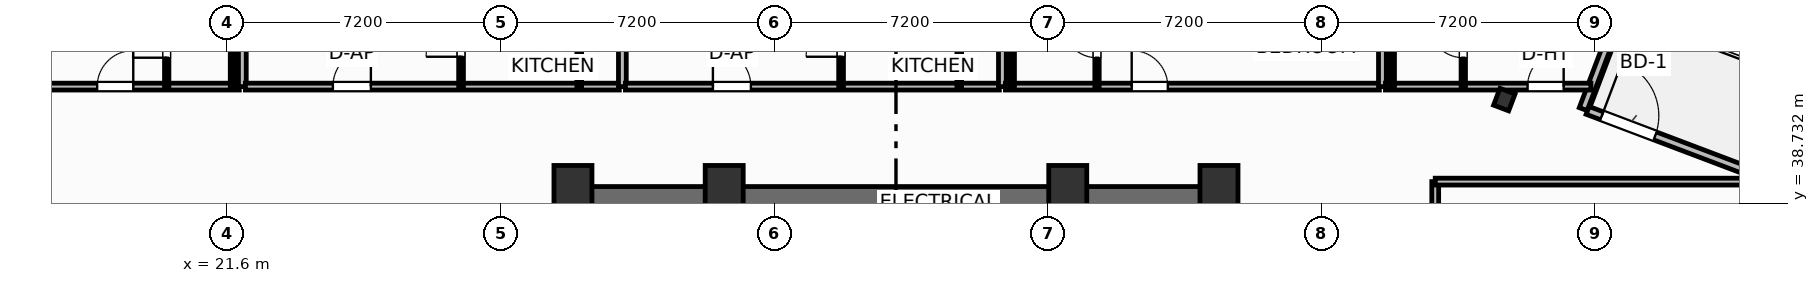
"""IFC4 building model, lengths in metres.
Left out: names, types, materials, properties, quantities, classifications, styles, units other than length and angle.
Written with IfcOpenShell. Run it as: python <this file> out.ifc"""

import sys

from ifc_helpers import new_model, si_unit, direction, frame, frame_2d, origin, origin_2d, place, context, subcontext, project, spatial, rectangle, i_section, extrude, element, fill, save


model = new_model("IFC4")
c1 = context("Model", 3, precision=1e-05, world=origin(), true_north=direction((0.0, 1.0)))
c2 = subcontext(c1, "Body", "Model", "MODEL_VIEW")
j1 = project(units=[si_unit("LENGTHUNIT", "METRE"), si_unit("PLANEANGLEUNIT", "RADIAN")], contexts=[c1])
p1 = place(None, origin())
s1 = spatial("IfcSite", under=j1, at=p1, CompositionType="ELEMENT")
p2 = place(p1, origin())
s2 = spatial("IfcBuilding", under=s1, at=p2, CompositionType="ELEMENT")
p3 = place(p2, frame((0.0, 0.0, 105.8)))
s3 = spatial("IfcBuildingStorey", under=s2, at=p3, CompositionType="ELEMENT", Elevation=105.8)
for number, where, z_axis, x_axis in (
    (1, (30.7, 39.05, 0.0), (0.0, 0.0, 1.0), (1.0, 0.0, 0.0)),
    (2, (34.68, 39.05, 0.0), (0.0, 0.0, 1.0), (1.0, 0.0, 0.0)),
    (3, (43.72, 39.05, 0.0), (0.0, 0.0, 1.0), (1.0, 0.0, 0.0)),
    (4, (47.7, 39.05, 0.0), (0.0, 0.0, 1.0), (1.0, 0.0, 0.0)),
):
    element("IfcColumn", number, at=place(p3, frame(where, z_axis=z_axis, x_axis=x_axis)), inside=s3, PredefinedType="COLUMN", context=c2, shape_type="SweptSolid", body=[
        extrude(rectangle(XDim=1.0, YDim=1.35, at=origin_2d()), origin(), (0.0, 0.0, 1.0), 3.7),
    ])
p4 = place(p3, frame((30.38, 38.795, 0.0), z_axis=(0.0, 0.0, 1.0), x_axis=(1.0, 0.0, 0.0)))
e5 = element("IfcWall", 5, at=p4, inside=s3, PredefinedType="SHEAR", context=c2, shape_type="SweptSolid", body=[
    extrude(rectangle(XDim=17.64, YDim=0.75, at=frame_2d((8.82, 0.0))), origin(), (0.0, 0.0, 1.0), 3.45),
])
p5 = place(p3, frame((55.208, 41.459, 0.0), z_axis=(0.0, 0.0, 1.0), x_axis=(0.935221751401, -0.354062530786, 0.0)))
e6 = element("IfcColumn", 6, at=p5, inside=s3, PredefinedType="COLUMN", context=c2, shape_type="SweptSolid", body=[
    extrude(i_section(OverallWidth=0.424, OverallDepth=0.474, WebThickness=0.048, FlangeThickness=0.077, FilletRadius=0.025, at=origin_2d()), origin(), (0.0, 0.0, 1.0), 3.7),
])
p6 = place(p3, frame((57.399, 41.175, 0.0), z_axis=(0.0, 0.0, 1.0), x_axis=(0.935227640088, -0.354046976001, 0.0)))
e7 = element("IfcWall", 7, at=p6, inside=s3, PredefinedType="SOLIDWALL", context=c2, shape_type="SweptSolid", body=[
    extrude(rectangle(XDim=6.0, YDim=0.22, at=frame_2d((3.0, 0.0))), origin(), (0.0, 0.0, 1.0), 2.73),
])
p7 = place(p6, frame((0.4, 0.0, 0.0)))
e8 = element("IfcOpeningElement", 8, at=p7, cuts=e7, PredefinedType="OPENING", context=c2, shape_type="SweptSolid", body=[
    extrude(rectangle(XDim=1.5, YDim=2.25, at=frame_2d((0.75, 1.125))), frame((0.0, 0.12, 0.0), z_axis=(0.0, -1.0, 0.0), x_axis=(1.0, 0.0, 0.0)), (0.0, 0.0, 1.0), 0.24),
])
p8 = place(p3, frame((57.284, 41.208, 0.0), z_axis=(0.0, 0.0, 1.0), x_axis=(0.354128469405, 0.935196785258, 0.0)))
e9 = element("IfcWall", 9, at=p8, inside=s3, PredefinedType="SOLIDWALL", context=c2, shape_type="SweptSolid", body=[
    extrude(rectangle(XDim=2.1, YDim=0.22, at=frame_2d((1.05, 0.0))), origin(), (0.0, 0.0, 1.0), 2.73),
])
p9 = place(p3, frame((5.646, 41.8, 0.0), z_axis=(0.0, 0.0, 1.0), x_axis=(1.0, 0.0, 0.0)))
e10 = element("IfcWall", 10, at=p9, inside=s3, PredefinedType="PARTITIONING", context=c2, shape_type="SweptSolid", body=[
    extrude(rectangle(XDim=16.274, YDim=0.18, at=frame_2d((8.137, 0.0))), origin(), (0.0, 0.0, 1.0), 3.45),
])
p10 = place(p9, frame((12.534, 0.0, 0.0)))
e11 = element("IfcOpeningElement", 11, at=p10, cuts=e10, PredefinedType="OPENING", context=c2, shape_type="SweptSolid", body=[
    extrude(rectangle(XDim=0.95, YDim=2.15, at=frame_2d((0.475, 1.075))), frame((0.0, 0.1, 0.0), z_axis=(0.0, -1.0, 0.0), x_axis=(1.0, 0.0, 0.0)), (0.0, 0.0, 1.0), 0.2),
])
p11 = place(p3, frame((20.01, 41.8, 0.0), z_axis=(0.0, 0.0, 1.0), x_axis=(0.0, 1.0, 0.0)))
e12 = element("IfcWall", 12, at=p11, inside=s3, PredefinedType="PARTITIONING", context=c2, shape_type="SweptSolid", body=[
    extrude(rectangle(XDim=2.52, YDim=0.115, at=frame_2d((1.26, 0.0))), origin(), (0.0, 0.0, 1.0), 3.45),
])
p12 = place(p11, frame((0.76, 0.0, 0.0)))
e13 = element("IfcOpeningElement", 13, at=p12, cuts=e12, PredefinedType="OPENING", context=c2, shape_type="SweptSolid", body=[
    extrude(rectangle(XDim=0.9, YDim=2.05, at=frame_2d((0.45, 1.025))), frame((0.0, 0.067, 0.0), z_axis=(0.0, -1.0, 0.0), x_axis=(1.0, 0.0, 0.0)), (0.0, 0.0, 1.0), 0.135),
])
p13 = place(p3, frame((21.74, 41.8, 0.0), z_axis=(0.0, 0.0, 1.0), x_axis=(0.0, 1.0, 0.0)))
e14 = element("IfcWall", 14, at=p13, inside=s3, PredefinedType="PARTITIONING", context=c2, shape_type="SweptSolid", body=[
    extrude(rectangle(XDim=2.52, YDim=0.115, at=frame_2d((1.26, 0.0))), origin(), (0.0, 0.0, 1.0), 3.45),
])
p14 = place(p3, frame((22.0, 41.8, 0.0), z_axis=(0.0, 0.0, 1.0), x_axis=(0.0, 1.0, 0.0)))
e15 = element("IfcWall", 15, at=p14, inside=s3, PredefinedType="PARTITIONING", context=c2, shape_type="SweptSolid", body=[
    extrude(rectangle(XDim=14.906, YDim=0.205, at=frame_2d((7.453, 0.0))), origin(), (0.0, 0.0, 1.0), 3.45),
])
p15 = place(p3, frame((22.08, 41.8, 0.0), z_axis=(0.0, 0.0, 1.0), x_axis=(1.0, 0.0, 0.0)))
e16 = element("IfcWall", 16, at=p15, inside=s3, PredefinedType="PARTITIONING", context=c2, shape_type="SweptSolid", body=[
    extrude(rectangle(XDim=9.84, YDim=0.18, at=frame_2d((4.92, 0.0))), origin(), (0.0, 0.0, 1.0), 3.45),
])
p16 = place(p15, frame((2.302, 0.0, 0.0)))
e17 = element("IfcOpeningElement", 17, at=p16, cuts=e16, PredefinedType="OPENING", context=c2, shape_type="SweptSolid", body=[
    extrude(rectangle(XDim=1.0, YDim=2.2, at=frame_2d((0.5, 1.1))), frame((0.0, 0.1, 0.0), z_axis=(0.0, -1.0, 0.0), x_axis=(1.0, 0.0, 0.0)), (0.0, 0.0, 1.0), 0.2),
])
p17 = place(p3, frame((27.755, 41.8, 0.0), z_axis=(0.0, 0.0, 1.0), x_axis=(0.0, 1.0, 0.0)))
e18 = element("IfcWall", 18, at=p17, inside=s3, PredefinedType="PARTITIONING", context=c2, shape_type="SweptSolid", body=[
    extrude(rectangle(XDim=12.811, YDim=0.125, at=frame_2d((6.405, 0.0))), origin(), (0.0, 0.0, 1.0), 3.45),
])
p18 = place(p17, frame((0.785, 0.0, 0.0)))
e19 = element("IfcOpeningElement", 19, at=p18, cuts=e18, PredefinedType="OPENING", context=c2, shape_type="SweptSolid", body=[
    extrude(rectangle(XDim=0.92, YDim=2.05, at=frame_2d((0.46, 1.025))), frame((0.0, 0.073, 0.0), z_axis=(0.0, -1.0, 0.0), x_axis=(1.0, 0.0, 0.0)), (0.0, 0.0, 1.0), 0.145),
])
p19 = place(p17, frame((3.037, 0.0, 0.0)))
e20 = element("IfcOpeningElement", 20, at=p19, cuts=e18, PredefinedType="OPENING", context=c2, shape_type="SweptSolid", body=[
    extrude(rectangle(XDim=0.9, YDim=2.05, at=frame_2d((0.45, 1.025))), frame((0.0, 0.073, 0.0), z_axis=(0.0, -1.0, 0.0), x_axis=(1.0, 0.0, 0.0)), (0.0, 0.0, 1.0), 0.145),
])
p20 = place(p17, frame((10.089, 0.0, 0.0)))
e21 = element("IfcOpeningElement", 21, at=p20, cuts=e18, PredefinedType="OPENING", context=c2, shape_type="SweptSolid", body=[
    extrude(rectangle(XDim=0.92, YDim=2.05, at=frame_2d((0.46, 1.025))), frame((0.0, 0.073, 0.0), z_axis=(0.0, -1.0, 0.0), x_axis=(1.0, 0.0, 0.0)), (0.0, 0.0, 1.0), 0.145),
])
p21 = place(p3, frame((30.865, 41.8, 0.0), z_axis=(0.0, 0.0, 1.0), x_axis=(0.0, 1.0, 0.0)))
e22 = element("IfcWall", 22, at=p21, inside=s3, PredefinedType="PARTITIONING", context=c2, shape_type="SweptSolid", body=[
    extrude(rectangle(XDim=2.41, YDim=0.125, at=frame_2d((1.205, 0.0))), origin(), (0.0, 0.0, 1.0), 3.45),
])
p22 = place(p3, frame((32.0, 41.8, 0.0), z_axis=(0.0, 0.0, 1.0), x_axis=(0.0, 1.0, 0.0)))
e23 = element("IfcWall", 23, at=p22, inside=s3, PredefinedType="PARTITIONING", context=c2, shape_type="SweptSolid", body=[
    extrude(rectangle(XDim=8.958, YDim=0.205, at=frame_2d((4.479, 0.0))), origin(), (0.0, 0.0, 1.0), 3.45),
])
p23 = place(p3, frame((32.08, 41.8, 0.0), z_axis=(0.0, 0.0, 1.0), x_axis=(1.0, 0.0, 0.0)))
e24 = element("IfcWall", 24, at=p23, inside=s3, PredefinedType="PARTITIONING", context=c2, shape_type="SweptSolid", body=[
    extrude(rectangle(XDim=9.84, YDim=0.18, at=frame_2d((4.92, 0.0))), origin(), (0.0, 0.0, 1.0), 3.45),
])
p24 = place(p23, frame((2.302, 0.0, 0.0)))
e25 = element("IfcOpeningElement", 25, at=p24, cuts=e24, PredefinedType="OPENING", context=c2, shape_type="SweptSolid", body=[
    extrude(rectangle(XDim=1.0, YDim=2.2, at=frame_2d((0.5, 1.1))), frame((0.0, 0.1, 0.0), z_axis=(0.0, -1.0, 0.0), x_axis=(1.0, 0.0, 0.0)), (0.0, 0.0, 1.0), 0.2),
])
p25 = place(p3, frame((37.755, 41.8, 0.0), z_axis=(0.0, 0.0, 1.0), x_axis=(0.0, 1.0, 0.0)))
e26 = element("IfcWall", 26, at=p25, inside=s3, PredefinedType="PARTITIONING", context=c2, shape_type="SweptSolid", body=[
    extrude(rectangle(XDim=9.025, YDim=0.125, at=frame_2d((4.512, 0.0))), origin(), (0.0, 0.0, 1.0), 3.45),
])
p26 = place(p25, frame((0.785, 0.0, 0.0)))
e27 = element("IfcOpeningElement", 27, at=p26, cuts=e26, PredefinedType="OPENING", context=c2, shape_type="SweptSolid", body=[
    extrude(rectangle(XDim=0.92, YDim=2.05, at=frame_2d((0.46, 1.025))), frame((0.0, 0.073, 0.0), z_axis=(0.0, -1.0, 0.0), x_axis=(1.0, 0.0, 0.0)), (0.0, 0.0, 1.0), 0.145),
])
p27 = place(p25, frame((3.037, 0.0, 0.0)))
e28 = element("IfcOpeningElement", 28, at=p27, cuts=e26, PredefinedType="OPENING", context=c2, shape_type="SweptSolid", body=[
    extrude(rectangle(XDim=0.9, YDim=2.05, at=frame_2d((0.45, 1.025))), frame((0.0, 0.073, 0.0), z_axis=(0.0, -1.0, 0.0), x_axis=(1.0, 0.0, 0.0)), (0.0, 0.0, 1.0), 0.145),
])
p28 = place(p25, frame((6.678, 0.0, 0.0)))
e29 = element("IfcOpeningElement", 29, at=p28, cuts=e26, PredefinedType="OPENING", context=c2, shape_type="SweptSolid", body=[
    extrude(rectangle(XDim=0.92, YDim=2.05, at=frame_2d((0.46, 1.025))), frame((0.0, 0.073, 0.0), z_axis=(0.0, -1.0, 0.0), x_axis=(1.0, 0.0, 0.0)), (0.0, 0.0, 1.0), 0.145),
])
p29 = place(p3, frame((40.865, 41.8, 0.0), z_axis=(0.0, 0.0, 1.0), x_axis=(0.0, 1.0, 0.0)))
e30 = element("IfcWall", 30, at=p29, inside=s3, PredefinedType="PARTITIONING", context=c2, shape_type="SweptSolid", body=[
    extrude(rectangle(XDim=2.41, YDim=0.125, at=frame_2d((1.205, 0.0))), origin(), (0.0, 0.0, 1.0), 3.45),
])
p30 = place(p3, frame((42.0, 41.8, 0.0), z_axis=(0.0, 0.0, 1.0), x_axis=(0.0, 1.0, 0.0)))
e31 = element("IfcWall", 31, at=p30, inside=s3, PredefinedType="PARTITIONING", context=c2, shape_type="SweptSolid", body=[
    extrude(rectangle(XDim=7.418, YDim=0.205, at=frame_2d((3.709, 0.0))), origin(), (0.0, 0.0, 1.0), 3.45),
])
p31 = place(p3, frame((42.08, 41.8, 0.0), z_axis=(0.0, 0.0, 1.0), x_axis=(1.0, 0.0, 0.0)))
e32 = element("IfcWall", 32, at=p31, inside=s3, PredefinedType="PARTITIONING", context=c2, shape_type="SweptSolid", body=[
    extrude(rectangle(XDim=9.84, YDim=0.18, at=frame_2d((4.92, 0.0))), origin(), (0.0, 0.0, 1.0), 3.45),
])
p32 = place(p31, frame((3.323, 0.0, 0.0)))
e33 = element("IfcOpeningElement", 33, at=p32, cuts=e32, PredefinedType="OPENING", context=c2, shape_type="SweptSolid", body=[
    extrude(rectangle(XDim=0.95, YDim=2.15, at=frame_2d((0.475, 1.075))), frame((0.0, 0.1, 0.0), z_axis=(0.0, -1.0, 0.0), x_axis=(1.0, 0.0, 0.0)), (0.0, 0.0, 1.0), 0.2),
])
p33 = place(p3, frame((44.49, 41.8, 0.0), z_axis=(0.0, 0.0, 1.0), x_axis=(0.0, 1.0, 0.0)))
e34 = element("IfcWall", 34, at=p33, inside=s3, PredefinedType="PARTITIONING", context=c2, shape_type="SweptSolid", body=[
    extrude(rectangle(XDim=2.52, YDim=0.115, at=frame_2d((1.26, 0.0))), origin(), (0.0, 0.0, 1.0), 3.45),
])
p34 = place(p33, frame((0.76, 0.0, 0.0)))
e35 = element("IfcOpeningElement", 35, at=p34, cuts=e34, PredefinedType="OPENING", context=c2, shape_type="SweptSolid", body=[
    extrude(rectangle(XDim=0.9, YDim=2.05, at=frame_2d((0.45, 1.025))), frame((0.0, 0.067, 0.0), z_axis=(0.0, -1.0, 0.0), x_axis=(1.0, 0.0, 0.0)), (0.0, 0.0, 1.0), 0.135),
])
p35 = place(p3, frame((42.26, 41.8, 0.0), z_axis=(0.0, 0.0, 1.0), x_axis=(0.0, 1.0, 0.0)))
e36 = element("IfcWall", 36, at=p35, inside=s3, PredefinedType="PARTITIONING", context=c2, shape_type="SweptSolid", body=[
    extrude(rectangle(XDim=2.52, YDim=0.115, at=frame_2d((1.26, 0.0))), origin(), (0.0, 0.0, 1.0), 3.45),
])
p36 = place(p3, frame((52.0, 41.8, 0.0), z_axis=(0.0, 0.0, 1.0), x_axis=(0.0, 1.0, 0.0)))
e37 = element("IfcWall", 37, at=p36, inside=s3, PredefinedType="PARTITIONING", context=c2, shape_type="SweptSolid", body=[
    extrude(rectangle(XDim=3.632, YDim=0.205, at=frame_2d((1.816, 0.0))), origin(), (0.0, 0.0, 1.0), 3.45),
])
p37 = place(p3, frame((52.08, 41.8, 0.0), z_axis=(0.0, 0.0, 1.0), x_axis=(1.0, 0.0, 0.0)))
e38 = element("IfcWall", 38, at=p37, inside=s3, PredefinedType="PARTITIONING", context=c2, shape_type="SweptSolid", body=[
    extrude(rectangle(XDim=5.406, YDim=0.18, at=frame_2d((2.703, 0.0))), origin(), (0.0, 0.0, 1.0), 3.45),
])
p38 = place(p37, frame((3.74, 0.0, 0.0)))
e39 = element("IfcOpeningElement", 39, at=p38, cuts=e38, PredefinedType="OPENING", context=c2, shape_type="SweptSolid", body=[
    extrude(rectangle(XDim=0.95, YDim=2.15, at=frame_2d((0.475, 1.075))), frame((0.0, 0.1, 0.0), z_axis=(0.0, -1.0, 0.0), x_axis=(1.0, 0.0, 0.0)), (0.0, 0.0, 1.0), 0.2),
])
p39 = place(p3, frame((54.128, 41.8, 0.0), z_axis=(0.0, 0.0, 1.0), x_axis=(0.0, 1.0, 0.0)))
e40 = element("IfcWall", 40, at=p39, inside=s3, PredefinedType="PARTITIONING", context=c2, shape_type="SweptSolid", body=[
    extrude(rectangle(XDim=2.52, YDim=0.115, at=frame_2d((1.26, 0.0))), origin(), (0.0, 0.0, 1.0), 3.45),
])
p40 = place(p39, frame((0.76, 0.0, 0.0)))
e41 = element("IfcOpeningElement", 41, at=p40, cuts=e40, PredefinedType="OPENING", context=c2, shape_type="SweptSolid", body=[
    extrude(rectangle(XDim=0.9, YDim=2.05, at=frame_2d((0.45, 1.025))), frame((0.0, 0.067, 0.0), z_axis=(0.0, -1.0, 0.0), x_axis=(1.0, 0.0, 0.0)), (0.0, 0.0, 1.0), 0.135),
])
p41 = place(p3, frame((52.26, 41.8, 0.0), z_axis=(0.0, 0.0, 1.0), x_axis=(0.0, 1.0, 0.0)))
e42 = element("IfcWall", 42, at=p41, inside=s3, PredefinedType="PARTITIONING", context=c2, shape_type="SweptSolid", body=[
    extrude(rectangle(XDim=2.52, YDim=0.115, at=frame_2d((1.26, 0.0))), origin(), (0.0, 0.0, 1.0), 3.45),
])
p42 = place(p3, frame((53.39, 26.84, 0.0), z_axis=(0.0, 0.0, 1.0), x_axis=(0.0, 1.0, 0.0)))
e43 = element("IfcWall", 43, at=p42, inside=s3, PredefinedType="PARTITIONING", context=c2, shape_type="SweptSolid", body=[
    extrude(rectangle(XDim=12.46, YDim=0.18, at=frame_2d((6.23, 0.0))), origin(), (0.0, 0.0, 1.0), 3.45),
])
p43 = place(p42, frame((0.618, 0.0, 0.0)))
e44 = element("IfcOpeningElement", 44, at=p43, cuts=e43, PredefinedType="OPENING", context=c2, shape_type="SweptSolid", body=[
    extrude(rectangle(XDim=0.92, YDim=2.05, at=frame_2d((0.46, 1.025))), frame((0.0, 0.1, 0.0), z_axis=(0.0, -1.0, 0.0), x_axis=(1.0, 0.0, 0.0)), (0.0, 0.0, 1.0), 0.2),
])
p44 = place(p3, frame((53.39, 39.3, 0.0), z_axis=(0.0, 0.0, 1.0), x_axis=(1.0, 0.0, 0.0)))
e45 = element("IfcWall", 45, at=p44, inside=s3, PredefinedType="PARTITIONING", context=c2, shape_type="SweptSolid", body=[
    extrude(rectangle(XDim=8.876, YDim=0.18, at=frame_2d((4.438, 0.0))), origin(), (0.0, 0.0, 1.0), 3.45),
])
p45 = place(p7, origin())
e46 = element("IfcDoor", 46, at=p45, inside=s3, OperationType="SINGLE_SWING_LEFT", PredefinedType="DOOR", context=c2, shape_type="SweptSolid", body=[
    extrude(rectangle(XDim=1.5, YDim=2.25, at=frame_2d((0.75, 1.125))), frame((0.0, 0.025, 0.0), z_axis=(0.0, -1.0, 0.0), x_axis=(1.0, 0.0, 0.0)), (0.0, 0.0, 1.0), 0.05),
])
fill(e8, e46)
p46 = place(p10, origin())
e47 = element("IfcDoor", 47, at=p46, inside=s3, OperationType="SINGLE_SWING_RIGHT", PredefinedType="DOOR", context=c2, shape_type="SweptSolid", body=[
    extrude(rectangle(XDim=0.95, YDim=2.15, at=frame_2d((0.475, 1.075))), frame((0.0, 0.025, 0.0), z_axis=(0.0, -1.0, 0.0), x_axis=(1.0, 0.0, 0.0)), (0.0, 0.0, 1.0), 0.05),
])
fill(e11, e47)
p47 = place(p12, origin())
e48 = element("IfcDoor", 48, at=p47, inside=s3, OperationType="SINGLE_SWING_LEFT", PredefinedType="DOOR", context=c2, shape_type="SweptSolid", body=[
    extrude(rectangle(XDim=0.9, YDim=2.05, at=frame_2d((0.45, 1.025))), frame((0.0, 0.025, 0.0), z_axis=(0.0, -1.0, 0.0), x_axis=(1.0, 0.0, 0.0)), (0.0, 0.0, 1.0), 0.05),
])
fill(e13, e48)
p48 = place(p16, origin())
e49 = element("IfcDoor", 49, at=p48, inside=s3, OperationType="SINGLE_SWING_RIGHT", PredefinedType="DOOR", context=c2, shape_type="SweptSolid", body=[
    extrude(rectangle(XDim=1.0, YDim=2.2, at=frame_2d((0.5, 1.1))), frame((0.0, 0.025, 0.0), z_axis=(0.0, -1.0, 0.0), x_axis=(1.0, 0.0, 0.0)), (0.0, 0.0, 1.0), 0.05),
])
fill(e17, e49)
p49 = place(p18, origin())
e50 = element("IfcDoor", 50, at=p49, inside=s3, OperationType="SINGLE_SWING_LEFT", PredefinedType="DOOR", context=c2, shape_type="SweptSolid", body=[
    extrude(rectangle(XDim=0.92, YDim=2.05, at=frame_2d((0.46, 1.025))), frame((0.0, 0.025, 0.0), z_axis=(0.0, -1.0, 0.0), x_axis=(1.0, 0.0, 0.0)), (0.0, 0.0, 1.0), 0.05),
])
fill(e19, e50)
p50 = place(p24, origin())
e51 = element("IfcDoor", 51, at=p50, inside=s3, OperationType="SINGLE_SWING_LEFT", PredefinedType="DOOR", context=c2, shape_type="SweptSolid", body=[
    extrude(rectangle(XDim=1.0, YDim=2.2, at=frame_2d((0.5, 1.1))), frame((0.0, 0.025, 0.0), z_axis=(0.0, -1.0, 0.0), x_axis=(1.0, 0.0, 0.0)), (0.0, 0.0, 1.0), 0.05),
])
fill(e25, e51)
p51 = place(p26, origin())
e52 = element("IfcDoor", 52, at=p51, inside=s3, OperationType="SINGLE_SWING_LEFT", PredefinedType="DOOR", context=c2, shape_type="SweptSolid", body=[
    extrude(rectangle(XDim=0.92, YDim=2.05, at=frame_2d((0.46, 1.025))), frame((0.0, 0.025, 0.0), z_axis=(0.0, -1.0, 0.0), x_axis=(1.0, 0.0, 0.0)), (0.0, 0.0, 1.0), 0.05),
])
fill(e27, e52)
p52 = place(p32, origin())
e53 = element("IfcDoor", 53, at=p52, inside=s3, OperationType="SINGLE_SWING_LEFT", PredefinedType="DOOR", context=c2, shape_type="SweptSolid", body=[
    extrude(rectangle(XDim=0.95, YDim=2.15, at=frame_2d((0.475, 1.075))), frame((0.0, 0.025, 0.0), z_axis=(0.0, -1.0, 0.0), x_axis=(1.0, 0.0, 0.0)), (0.0, 0.0, 1.0), 0.05),
])
fill(e33, e53)
p53 = place(p34, origin())
e54 = element("IfcDoor", 54, at=p53, inside=s3, OperationType="SINGLE_SWING_RIGHT", PredefinedType="DOOR", context=c2, shape_type="SweptSolid", body=[
    extrude(rectangle(XDim=0.9, YDim=2.05, at=frame_2d((0.45, 1.025))), frame((0.0, 0.025, 0.0), z_axis=(0.0, -1.0, 0.0), x_axis=(1.0, 0.0, 0.0)), (0.0, 0.0, 1.0), 0.05),
])
fill(e35, e54)
p54 = place(p38, origin())
e55 = element("IfcDoor", 55, at=p54, inside=s3, OperationType="SINGLE_SWING_RIGHT", PredefinedType="DOOR", context=c2, shape_type="SweptSolid", body=[
    extrude(rectangle(XDim=0.95, YDim=2.15, at=frame_2d((0.475, 1.075))), frame((0.0, 0.025, 0.0), z_axis=(0.0, -1.0, 0.0), x_axis=(1.0, 0.0, 0.0)), (0.0, 0.0, 1.0), 0.05),
])
fill(e39, e55)
p55 = place(p40, origin())
e56 = element("IfcDoor", 56, at=p55, inside=s3, OperationType="SINGLE_SWING_RIGHT", PredefinedType="DOOR", context=c2, shape_type="SweptSolid", body=[
    extrude(rectangle(XDim=0.9, YDim=2.05, at=frame_2d((0.45, 1.025))), frame((0.0, 0.025, 0.0), z_axis=(0.0, -1.0, 0.0), x_axis=(1.0, 0.0, 0.0)), (0.0, 0.0, 1.0), 0.05),
])
fill(e41, e56)
save(model, sys.argv[1])
